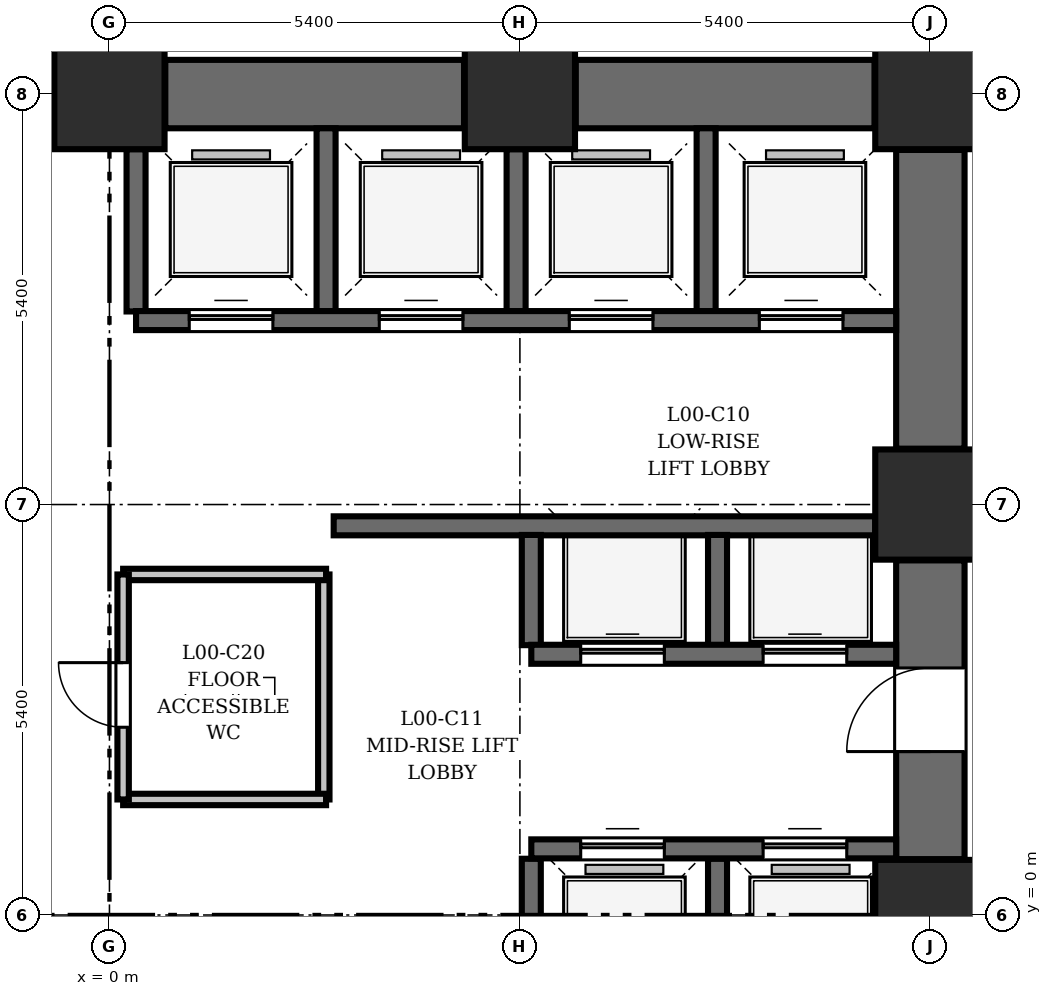
"""IFC4 building model, lengths in metres.
Left out: names, types, materials, properties, quantities, classifications, styles, units other than length and angle.
Written with IfcOpenShell. Run it as: python <this file> out.ifc"""

import sys

from ifc_helpers import new_model, si_unit, direction, frame, frame_2d, origin, origin_2d, place, context, subcontext, project, spatial, rectangle, extrude, element, fill, save


model = new_model("IFC4")
c1 = context("Model", 3, precision=1e-05, world=origin(), true_north=direction((0.0, 1.0)))
c2 = subcontext(c1, "Body", "Model", "MODEL_VIEW")
j1 = project(units=[si_unit("LENGTHUNIT", "METRE"), si_unit("PLANEANGLEUNIT", "RADIAN")], contexts=[c1])
p1 = place(None, origin())
s1 = spatial("IfcSite", under=j1, at=p1, CompositionType="ELEMENT")
p2 = place(p1, origin())
s2 = spatial("IfcBuilding", under=s1, at=p2, CompositionType="ELEMENT")
p3 = place(p2, origin())
s3 = spatial("IfcBuildingStorey", under=s2, at=p3, CompositionType="ELEMENT", Elevation=0.0)
for number, where, z_axis, x_axis in (
    (1, (0.0, 10.8, 0.0), (0.0, 0.0, 1.0), (1.0, 0.0, 0.0)),
    (2, (5.4, 10.8, 0.0), (0.0, 0.0, 1.0), (1.0, 0.0, 0.0)),
    (3, (10.8, 0.0, 0.0), (0.0, 0.0, 1.0), (1.0, 0.0, 0.0)),
    (4, (10.8, 5.4, 0.0), (0.0, 0.0, 1.0), (1.0, 0.0, 0.0)),
    (5, (10.8, 10.8, 0.0), (0.0, 0.0, 1.0), (1.0, 0.0, 0.0)),
):
    element("IfcColumn", number, at=place(p3, frame(where, z_axis=z_axis, x_axis=x_axis)), inside=s3, PredefinedType="COLUMN", context=c2, shape_type="SweptSolid", body=[
        extrude(rectangle(XDim=1.45, YDim=1.45, at=origin_2d()), origin(), (0.0, 0.0, 1.0), 4.5),
    ])
p4 = place(p3, frame((-4.665, 10.8, 0.0), z_axis=(0.0, 0.0, 1.0), x_axis=(1.0, 0.0, 0.0)))
e6 = element("IfcWall", 6, at=p4, inside=s3, PredefinedType="SHEAR", context=c2, shape_type="SweptSolid", body=[
    extrude(rectangle(XDim=3.93, YDim=0.9, at=frame_2d((1.965, 0.0))), origin(), (0.0, 0.0, 1.0), 4.5),
])
p5 = place(p4, frame((2.58, 0.0, 0.0)))
e7 = element("IfcOpeningElement", 7, at=p5, cuts=e6, PredefinedType="OPENING", context=c2, shape_type="SweptSolid", body=[
    extrude(rectangle(XDim=1.1, YDim=2.1, at=frame_2d((0.55, 1.05))), frame((0.0, 0.46, 0.0), z_axis=(0.0, -1.0, 0.0), x_axis=(1.0, 0.0, 0.0)), (0.0, 0.0, 1.0), 0.92),
])
p6 = place(p3, frame((0.735, 10.8, 0.0), z_axis=(0.0, 0.0, 1.0), x_axis=(1.0, 0.0, 0.0)))
e8 = element("IfcWall", 8, at=p6, inside=s3, PredefinedType="SHEAR", context=c2, shape_type="SweptSolid", body=[
    extrude(rectangle(XDim=3.93, YDim=0.9, at=frame_2d((1.965, 0.0))), origin(), (0.0, 0.0, 1.0), 4.5),
])
p7 = place(p3, frame((10.8, 0.735, 0.0), z_axis=(0.0, 0.0, 1.0), x_axis=(0.0, 1.0, 0.0)))
e9 = element("IfcWall", 9, at=p7, inside=s3, PredefinedType="SHEAR", context=c2, shape_type="SweptSolid", body=[
    extrude(rectangle(XDim=3.93, YDim=0.9, at=frame_2d((1.965, 0.0))), origin(), (0.0, 0.0, 1.0), 4.5),
])
p8 = place(p7, frame((1.415, 0.0, 0.0)))
e10 = element("IfcOpeningElement", 10, at=p8, cuts=e9, PredefinedType="OPENING", context=c2, shape_type="SweptSolid", body=[
    extrude(rectangle(XDim=1.1, YDim=2.1, at=frame_2d((0.55, 1.05))), frame((0.0, 0.46, 0.0), z_axis=(0.0, -1.0, 0.0), x_axis=(1.0, 0.0, 0.0)), (0.0, 0.0, 1.0), 0.92),
])
for number, where, z_axis, x_axis in (
    (11, (6.135, 10.8, 0.0), (0.0, 0.0, 1.0), (1.0, 0.0, 0.0)),
    (12, (10.8, 6.135, 0.0), (0.0, 0.0, 1.0), (0.0, 1.0, 0.0)),
):
    element("IfcWall", number, at=place(p3, frame(where, z_axis=z_axis, x_axis=x_axis)), inside=s3, PredefinedType="SHEAR", context=c2, shape_type="SweptSolid", body=[
        extrude(rectangle(XDim=3.93, YDim=0.9, at=frame_2d((1.965, 0.0))), origin(), (0.0, 0.0, 1.0), 4.5),
    ])
p9 = place(p3, frame((2.85, 7.94, 0.0), z_axis=(0.0, 0.0, 1.0), x_axis=(0.0, 1.0, 0.0)))
e13 = element("IfcWall", 13, at=p9, inside=s3, PredefinedType="SHEAR", context=c2, shape_type="SweptSolid", body=[
    extrude(rectangle(XDim=2.41, YDim=0.25, at=frame_2d((1.205, 0.0))), origin(), (0.0, 0.0, 1.0), 4.5),
])
for number, where, z_axis, x_axis in (
    (14, (0.35, 7.94, 0.0), (0.0, 0.0, 1.0), (0.0, 1.0, 0.0)),
    (15, (5.35, 7.94, 0.0), (0.0, 0.0, 1.0), (0.0, 1.0, 0.0)),
):
    element("IfcWall", number, at=place(p3, frame(where, z_axis=z_axis, x_axis=x_axis)), inside=s3, PredefinedType="SHEAR", context=c2, shape_type="SweptSolid", body=[
        extrude(rectangle(XDim=2.135, YDim=0.25, at=frame_2d((1.067, 0.0))), origin(), (0.0, 0.0, 1.0), 4.5),
    ])
p10 = place(p3, frame((7.85, 7.94, 0.0), z_axis=(0.0, 0.0, 1.0), x_axis=(0.0, 1.0, 0.0)))
e16 = element("IfcWall", 16, at=p10, inside=s3, PredefinedType="SHEAR", context=c2, shape_type="SweptSolid", body=[
    extrude(rectangle(XDim=2.41, YDim=0.25, at=frame_2d((1.205, 0.0))), origin(), (0.0, 0.0, 1.0), 4.5),
])
p11 = place(p3, frame((0.35, 7.82, 0.0), z_axis=(0.0, 0.0, 1.0), x_axis=(1.0, 0.0, 0.0)))
e17 = element("IfcWall", 17, at=p11, inside=s3, PredefinedType="SHEAR", context=c2, shape_type="SweptSolid", body=[
    extrude(rectangle(XDim=10.0, YDim=0.25, at=frame_2d((5.0, 0.0))), origin(), (0.0, 0.0, 1.0), 4.5),
])
p12 = place(p11, frame((0.7, 0.0, 0.0)))
e18 = element("IfcOpeningElement", 18, at=p12, cuts=e17, PredefinedType="OPENING", context=c2, shape_type="SweptSolid", body=[
    extrude(rectangle(XDim=1.1, YDim=2.1, at=frame_2d((0.55, 1.05))), frame((0.0, 0.135, 0.0), z_axis=(0.0, -1.0, 0.0), x_axis=(1.0, 0.0, 0.0)), (0.0, 0.0, 1.0), 0.27),
])
p13 = place(p11, frame((3.2, 0.0, 0.0)))
e19 = element("IfcOpeningElement", 19, at=p13, cuts=e17, PredefinedType="OPENING", context=c2, shape_type="SweptSolid", body=[
    extrude(rectangle(XDim=1.1, YDim=2.1, at=frame_2d((0.55, 1.05))), frame((0.0, 0.135, 0.0), z_axis=(0.0, -1.0, 0.0), x_axis=(1.0, 0.0, 0.0)), (0.0, 0.0, 1.0), 0.27),
])
p14 = place(p11, frame((5.7, 0.0, 0.0)))
e20 = element("IfcOpeningElement", 20, at=p14, cuts=e17, PredefinedType="OPENING", context=c2, shape_type="SweptSolid", body=[
    extrude(rectangle(XDim=1.1, YDim=2.1, at=frame_2d((0.55, 1.05))), frame((0.0, 0.135, 0.0), z_axis=(0.0, -1.0, 0.0), x_axis=(1.0, 0.0, 0.0)), (0.0, 0.0, 1.0), 0.27),
])
p15 = place(p11, frame((8.2, 0.0, 0.0)))
e21 = element("IfcOpeningElement", 21, at=p15, cuts=e17, PredefinedType="OPENING", context=c2, shape_type="SweptSolid", body=[
    extrude(rectangle(XDim=1.1, YDim=2.1, at=frame_2d((0.55, 1.05))), frame((0.0, 0.135, 0.0), z_axis=(0.0, -1.0, 0.0), x_axis=(1.0, 0.0, 0.0)), (0.0, 0.0, 1.0), 0.27),
])
p16 = place(p3, frame((2.95, 5.12, 0.0), z_axis=(0.0, 0.0, 1.0), x_axis=(1.0, 0.0, 0.0)))
e22 = element("IfcWall", 22, at=p16, inside=s3, PredefinedType="SHEAR", context=c2, shape_type="SweptSolid", body=[
    extrude(rectangle(XDim=7.125, YDim=0.25, at=frame_2d((3.562, 0.0))), origin(), (0.0, 0.0, 1.0), 4.5),
])
for number, where, z_axis, x_axis in (
    (23, (5.55, 3.55, 0.0), (0.0, 0.0, 1.0), (0.0, 1.0, 0.0)),
    (24, (8.0, 3.55, 0.0), (0.0, 0.0, 1.0), (0.0, 1.0, 0.0)),
):
    element("IfcWall", number, at=place(p3, frame(where, z_axis=z_axis, x_axis=x_axis)), inside=s3, PredefinedType="SHEAR", context=c2, shape_type="SweptSolid", body=[
        extrude(rectangle(XDim=1.45, YDim=0.25, at=frame_2d((0.725, 0.0))), origin(), (0.0, 0.0, 1.0), 4.5),
    ])
for number, where, z_axis, x_axis in (
    (25, (5.55, -1.3, 0.0), (0.0, 0.0, 1.0), (0.0, 1.0, 0.0)),
    (26, (8.0, -1.3, 0.0), (0.0, 0.0, 1.0), (0.0, 1.0, 0.0)),
):
    element("IfcWall", number, at=place(p3, frame(where, z_axis=z_axis, x_axis=x_axis)), inside=s3, PredefinedType="SHEAR", context=c2, shape_type="SweptSolid", body=[
        extrude(rectangle(XDim=2.04, YDim=0.25, at=frame_2d((1.02, 0.0))), origin(), (0.0, 0.0, 1.0), 4.5),
    ])
p17 = place(p3, frame((5.55, 3.43, 0.0), z_axis=(0.0, 0.0, 1.0), x_axis=(1.0, 0.0, 0.0)))
e27 = element("IfcWall", 27, at=p17, inside=s3, PredefinedType="SHEAR", context=c2, shape_type="SweptSolid", body=[
    extrude(rectangle(XDim=4.8, YDim=0.25, at=frame_2d((2.4, 0.0))), origin(), (0.0, 0.0, 1.0), 4.5),
])
p18 = place(p17, frame((0.65, 0.0, 0.0)))
e28 = element("IfcOpeningElement", 28, at=p18, cuts=e27, PredefinedType="OPENING", context=c2, shape_type="SweptSolid", body=[
    extrude(rectangle(XDim=1.1, YDim=2.1, at=frame_2d((0.55, 1.05))), frame((0.0, 0.135, 0.0), z_axis=(0.0, -1.0, 0.0), x_axis=(1.0, 0.0, 0.0)), (0.0, 0.0, 1.0), 0.27),
])
p19 = place(p17, frame((3.05, 0.0, 0.0)))
e29 = element("IfcOpeningElement", 29, at=p19, cuts=e27, PredefinedType="OPENING", context=c2, shape_type="SweptSolid", body=[
    extrude(rectangle(XDim=1.1, YDim=2.1, at=frame_2d((0.55, 1.05))), frame((0.0, 0.135, 0.0), z_axis=(0.0, -1.0, 0.0), x_axis=(1.0, 0.0, 0.0)), (0.0, 0.0, 1.0), 0.27),
])
p20 = place(p3, frame((5.55, 0.87, 0.0), z_axis=(0.0, 0.0, 1.0), x_axis=(1.0, 0.0, 0.0)))
e30 = element("IfcWall", 30, at=p20, inside=s3, PredefinedType="SHEAR", context=c2, shape_type="SweptSolid", body=[
    extrude(rectangle(XDim=4.8, YDim=0.25, at=frame_2d((2.4, 0.0))), origin(), (0.0, 0.0, 1.0), 4.5),
])
p21 = place(p20, frame((0.65, 0.0, 0.0)))
e31 = element("IfcOpeningElement", 31, at=p21, cuts=e30, PredefinedType="OPENING", context=c2, shape_type="SweptSolid", body=[
    extrude(rectangle(XDim=1.1, YDim=2.1, at=frame_2d((0.55, 1.05))), frame((0.0, 0.135, 0.0), z_axis=(0.0, -1.0, 0.0), x_axis=(1.0, 0.0, 0.0)), (0.0, 0.0, 1.0), 0.27),
])
p22 = place(p20, frame((3.05, 0.0, 0.0)))
e32 = element("IfcOpeningElement", 32, at=p22, cuts=e30, PredefinedType="OPENING", context=c2, shape_type="SweptSolid", body=[
    extrude(rectangle(XDim=1.1, YDim=2.1, at=frame_2d((0.55, 1.05))), frame((0.0, 0.135, 0.0), z_axis=(0.0, -1.0, 0.0), x_axis=(1.0, 0.0, 0.0)), (0.0, 0.0, 1.0), 0.27),
])
p23 = place(p3, frame((2.82, 1.52, 0.0), z_axis=(0.0, 0.0, 1.0), x_axis=(0.0, 1.0, 0.0)))
e33 = element("IfcWall", 33, at=p23, inside=s3, PredefinedType="PARTITIONING", context=c2, shape_type="SweptSolid", body=[
    extrude(rectangle(XDim=2.96, YDim=0.15, at=frame_2d((1.48, 0.0))), origin(), (0.0, 0.0, 1.0), 4.2),
])
for number, where, z_axis, x_axis in (
    (34, (0.18, 4.48, 0.0), (0.0, 0.0, 1.0), (1.0, 0.0, 0.0)),
    (35, (0.18, 1.52, 0.0), (0.0, 0.0, 1.0), (1.0, 0.0, 0.0)),
):
    element("IfcWall", number, at=place(p3, frame(where, z_axis=z_axis, x_axis=x_axis)), inside=s3, PredefinedType="PARTITIONING", context=c2, shape_type="SweptSolid", body=[
        extrude(rectangle(XDim=2.67, YDim=0.15, at=frame_2d((1.335, 0.0))), origin(), (0.0, 0.0, 1.0), 4.2),
    ])
p24 = place(p3, frame((0.18, 1.52, 0.0), z_axis=(0.0, 0.0, 1.0), x_axis=(0.0, 1.0, 0.0)))
e36 = element("IfcWall", 36, at=p24, inside=s3, PredefinedType="PARTITIONING", context=c2, shape_type="SweptSolid", body=[
    extrude(rectangle(XDim=2.96, YDim=0.15, at=frame_2d((1.48, 0.0))), origin(), (0.0, 0.0, 1.0), 4.2),
])
p25 = place(p24, frame((0.95, 0.0, 0.0)))
e37 = element("IfcOpeningElement", 37, at=p25, cuts=e36, PredefinedType="OPENING", context=c2, shape_type="SweptSolid", body=[
    extrude(rectangle(XDim=0.85, YDim=2.1, at=frame_2d((0.425, 1.05))), frame((0.0, 0.085, 0.0), z_axis=(0.0, -1.0, 0.0), x_axis=(1.0, 0.0, 0.0)), (0.0, 0.0, 1.0), 0.17),
])
p26 = place(p3, frame((10.85, 0.0, 0.0), z_axis=(0.0, 0.0, 1.0), x_axis=(1.0, 0.0, 0.0)))
e38 = element("IfcWall", 38, at=p26, inside=s3, PredefinedType="PARTITIONING", context=c2, shape_type="SweptSolid", body=[
    extrude(rectangle(XDim=10.71, YDim=0.2, at=frame_2d((5.355, 0.0))), origin(), (0.0, 0.0, 1.0), 2.205),
])
p27 = place(p26, frame((2.25, 0.0, 0.0)))
e39 = element("IfcOpeningElement", 39, at=p27, cuts=e38, PredefinedType="OPENING", context=c2, shape_type="SweptSolid", body=[
    extrude(rectangle(XDim=1.1, YDim=2.1, at=frame_2d((0.55, 1.05))), frame((0.0, 0.11, 0.0), z_axis=(0.0, -1.0, 0.0), x_axis=(1.0, 0.0, 0.0)), (0.0, 0.0, 1.0), 0.22),
])
p28 = place(p25, origin())
e40 = element("IfcDoor", 40, at=p28, inside=s3, OperationType="SINGLE_SWING_RIGHT", PredefinedType="DOOR", context=c2, shape_type="SweptSolid", body=[
    extrude(rectangle(XDim=0.85, YDim=2.1, at=frame_2d((0.425, 1.05))), frame((0.0, 0.025, 0.0), z_axis=(0.0, -1.0, 0.0), x_axis=(1.0, 0.0, 0.0)), (0.0, 0.0, 1.0), 0.05),
])
fill(e37, e40)
p29 = place(p12, origin())
e41 = element("IfcDoor", 41, at=p29, inside=s3, OperationType="SLIDING_TO_LEFT", PredefinedType="DOOR", context=c2, shape_type="SweptSolid", body=[
    extrude(rectangle(XDim=1.1, YDim=2.1, at=frame_2d((0.55, 1.05))), frame((0.0, 0.025, 0.0), z_axis=(0.0, -1.0, 0.0), x_axis=(1.0, 0.0, 0.0)), (0.0, 0.0, 1.0), 0.05),
])
fill(e18, e41)
p30 = place(p13, origin())
e42 = element("IfcDoor", 42, at=p30, inside=s3, OperationType="SLIDING_TO_LEFT", PredefinedType="DOOR", context=c2, shape_type="SweptSolid", body=[
    extrude(rectangle(XDim=1.1, YDim=2.1, at=frame_2d((0.55, 1.05))), frame((0.0, 0.025, 0.0), z_axis=(0.0, -1.0, 0.0), x_axis=(1.0, 0.0, 0.0)), (0.0, 0.0, 1.0), 0.05),
])
fill(e19, e42)
p31 = place(p14, origin())
e43 = element("IfcDoor", 43, at=p31, inside=s3, OperationType="SLIDING_TO_LEFT", PredefinedType="DOOR", context=c2, shape_type="SweptSolid", body=[
    extrude(rectangle(XDim=1.1, YDim=2.1, at=frame_2d((0.55, 1.05))), frame((0.0, 0.025, 0.0), z_axis=(0.0, -1.0, 0.0), x_axis=(1.0, 0.0, 0.0)), (0.0, 0.0, 1.0), 0.05),
])
fill(e20, e43)
p32 = place(p15, origin())
e44 = element("IfcDoor", 44, at=p32, inside=s3, OperationType="SLIDING_TO_LEFT", PredefinedType="DOOR", context=c2, shape_type="SweptSolid", body=[
    extrude(rectangle(XDim=1.1, YDim=2.1, at=frame_2d((0.55, 1.05))), frame((0.0, 0.025, 0.0), z_axis=(0.0, -1.0, 0.0), x_axis=(1.0, 0.0, 0.0)), (0.0, 0.0, 1.0), 0.05),
])
fill(e21, e44)
p33 = place(p18, origin())
e45 = element("IfcDoor", 45, at=p33, inside=s3, OperationType="SLIDING_TO_RIGHT", PredefinedType="DOOR", context=c2, shape_type="SweptSolid", body=[
    extrude(rectangle(XDim=1.1, YDim=2.1, at=frame_2d((0.55, 1.05))), frame((0.0, 0.025, 0.0), z_axis=(0.0, -1.0, 0.0), x_axis=(1.0, 0.0, 0.0)), (0.0, 0.0, 1.0), 0.05),
])
fill(e28, e45)
p34 = place(p19, origin())
e46 = element("IfcDoor", 46, at=p34, inside=s3, OperationType="SLIDING_TO_RIGHT", PredefinedType="DOOR", context=c2, shape_type="SweptSolid", body=[
    extrude(rectangle(XDim=1.1, YDim=2.1, at=frame_2d((0.55, 1.05))), frame((0.0, 0.025, 0.0), z_axis=(0.0, -1.0, 0.0), x_axis=(1.0, 0.0, 0.0)), (0.0, 0.0, 1.0), 0.05),
])
fill(e29, e46)
p35 = place(p21, origin())
e47 = element("IfcDoor", 47, at=p35, inside=s3, OperationType="SLIDING_TO_RIGHT", PredefinedType="DOOR", context=c2, shape_type="SweptSolid", body=[
    extrude(rectangle(XDim=1.1, YDim=2.1, at=frame_2d((0.55, 1.05))), frame((0.0, 0.025, 0.0), z_axis=(0.0, -1.0, 0.0), x_axis=(1.0, 0.0, 0.0)), (0.0, 0.0, 1.0), 0.05),
])
fill(e31, e47)
p36 = place(p22, origin())
e48 = element("IfcDoor", 48, at=p36, inside=s3, OperationType="SLIDING_TO_RIGHT", PredefinedType="DOOR", context=c2, shape_type="SweptSolid", body=[
    extrude(rectangle(XDim=1.1, YDim=2.1, at=frame_2d((0.55, 1.05))), frame((0.0, 0.025, 0.0), z_axis=(0.0, -1.0, 0.0), x_axis=(1.0, 0.0, 0.0)), (0.0, 0.0, 1.0), 0.05),
])
fill(e32, e48)
p37 = place(p8, origin())
e49 = element("IfcDoor", 49, at=p37, inside=s3, OperationType="SINGLE_SWING_LEFT", PredefinedType="DOOR", context=c2, shape_type="SweptSolid", body=[
    extrude(rectangle(XDim=1.1, YDim=2.1, at=frame_2d((0.55, 1.05))), frame((0.0, 0.025, 0.0), z_axis=(0.0, -1.0, 0.0), x_axis=(1.0, 0.0, 0.0)), (0.0, 0.0, 1.0), 0.05),
])
fill(e10, e49)
save(model, sys.argv[1])
